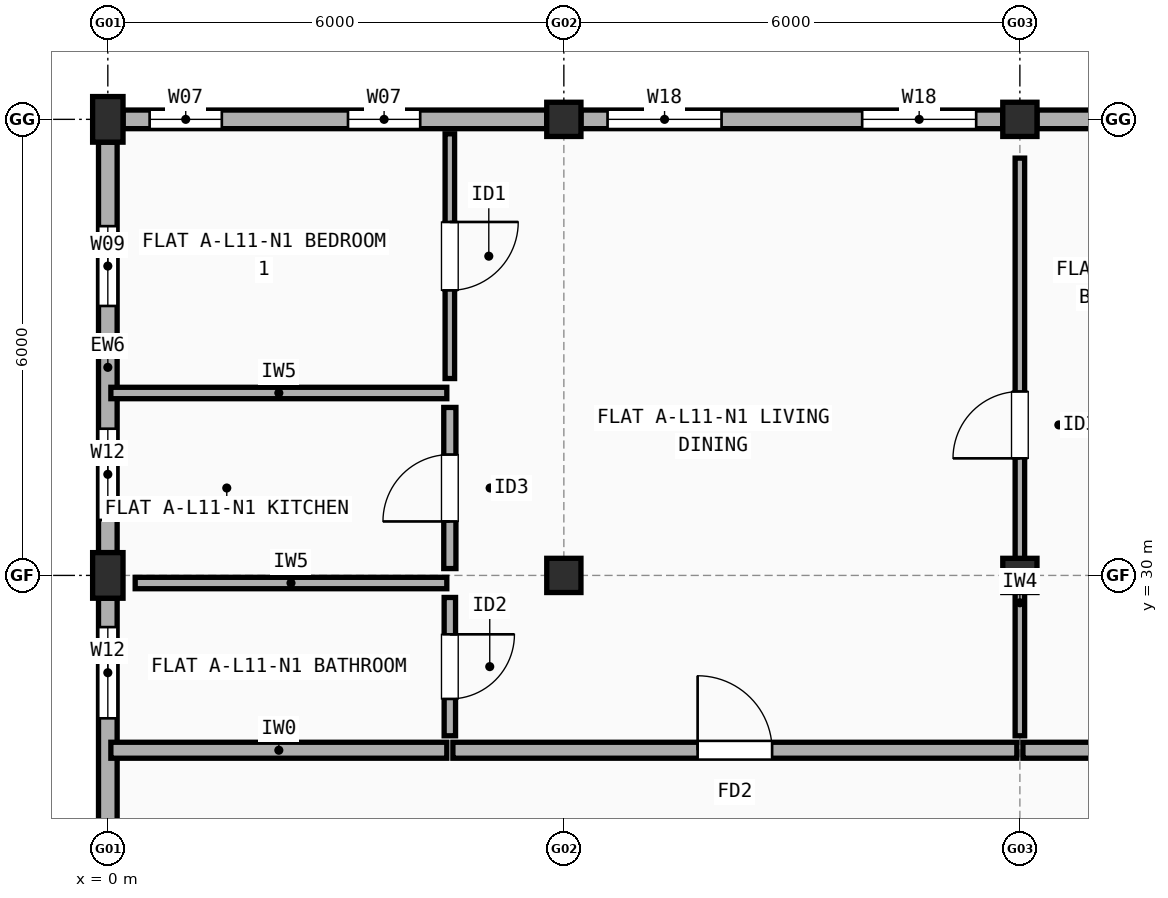
"""IFC4 building model, lengths in metres.
Left out: names, types, materials, properties, quantities, classifications, styles, units other than length and angle.
Written with IfcOpenShell. Run it as: python <this file> out.ifc"""

import sys

from ifc_helpers import new_model, si_unit, direction, frame, frame_2d, origin, origin_2d, place, context, subcontext, project, spatial, rectangle, extrude, element, fill, save


model = new_model("IFC4")
c1 = context("Model", 3, precision=1e-05, world=origin(), true_north=direction((0.0, 1.0)))
c2 = subcontext(c1, "Body", "Model", "MODEL_VIEW")
j1 = project(units=[si_unit("LENGTHUNIT", "METRE"), si_unit("PLANEANGLEUNIT", "RADIAN")], contexts=[c1])
p1 = place(None, origin())
s1 = spatial("IfcSite", under=j1, at=p1, CompositionType="ELEMENT")
p2 = place(p1, origin())
s2 = spatial("IfcBuilding", under=s1, at=p2, CompositionType="ELEMENT")
p3 = place(p2, frame((0.0, 0.0, 36.5)))
s3 = spatial("IfcBuildingStorey", under=s2, at=p3, CompositionType="ELEMENT", Elevation=36.5)
for number, where, z_axis, x_axis in (
    (1, (0.0, 30.0, 0.0), (0.0, 0.0, 1.0), (1.0, 0.0, 0.0)),
    (2, (0.0, 36.0, 0.0), (0.0, 0.0, 1.0), (1.0, 0.0, 0.0)),
):
    element("IfcColumn", number, at=place(p3, frame(where, z_axis=z_axis, x_axis=x_axis)), inside=s3, PredefinedType="COLUMN", context=c2, shape_type="SweptSolid", body=[
        extrude(rectangle(XDim=0.4, YDim=0.6, at=origin_2d()), origin(), (0.0, 0.0, 1.0), 2.995),
    ])
for number, where, z_axis, x_axis in (
    (3, (6.0, 30.0, 0.0), (0.0, 0.0, 1.0), (1.0, 0.0, 0.0)),
    (4, (6.0, 36.0, 0.0), (0.0, 0.0, 1.0), (1.0, 0.0, 0.0)),
    (5, (12.0, 30.0, 0.0), (0.0, 0.0, 1.0), (1.0, 0.0, 0.0)),
    (6, (12.0, 36.0, 0.0), (0.0, 0.0, 1.0), (1.0, 0.0, 0.0)),
):
    element("IfcColumn", number, at=place(p3, frame(where, z_axis=z_axis, x_axis=x_axis)), inside=s3, PredefinedType="COLUMN", context=c2, shape_type="SweptSolid", body=[
        extrude(rectangle(XDim=0.45, YDim=0.45, at=origin_2d()), origin(), (0.0, 0.0, 1.0), 2.995),
    ])
p4 = place(p3, frame((17.775, 36.0, 0.0), z_axis=(0.0, 0.0, 1.0), x_axis=(-1.0, 0.0, 0.0)))
e7 = element("IfcWall", 7, at=p4, inside=s3, PredefinedType="STANDARD", context=c2, shape_type="SweptSolid", body=[
    extrude(rectangle(XDim=5.55, YDim=0.245, at=frame_2d((2.775, 0.0))), origin(), (0.0, 0.0, 1.0), 2.477),
])
p5 = place(p4, frame((0.843, 0.0, 0.9)))
e8 = element("IfcOpeningElement", 8, at=p5, cuts=e7, PredefinedType="OPENING", context=c2, shape_type="SweptSolid", body=[
    extrude(rectangle(XDim=1.05, YDim=1.35, at=frame_2d((0.525, 0.675))), frame((0.0, 0.133, 0.0), z_axis=(0.0, -1.0, 0.0), x_axis=(1.0, 0.0, 0.0)), (0.0, 0.0, 1.0), 0.265),
])
p6 = place(p4, frame((3.583, 0.0, 0.9)))
e9 = element("IfcOpeningElement", 9, at=p6, cuts=e7, PredefinedType="OPENING", context=c2, shape_type="SweptSolid", body=[
    extrude(rectangle(XDim=1.2, YDim=1.35, at=frame_2d((0.6, 0.675))), frame((0.0, 0.133, 0.0), z_axis=(0.0, -1.0, 0.0), x_axis=(1.0, 0.0, 0.0)), (0.0, 0.0, 1.0), 0.265),
])
p7 = place(p3, frame((11.775, 36.0, 0.0), z_axis=(0.0, 0.0, 1.0), x_axis=(-1.0, 0.0, 0.0)))
e10 = element("IfcWall", 10, at=p7, inside=s3, PredefinedType="STANDARD", context=c2, shape_type="SweptSolid", body=[
    extrude(rectangle(XDim=5.55, YDim=0.245, at=frame_2d((2.775, 0.0))), origin(), (0.0, 0.0, 1.0), 2.477),
])
p8 = place(p7, frame((0.35, 0.0, 0.9)))
e11 = element("IfcOpeningElement", 11, at=p8, cuts=e10, PredefinedType="OPENING", context=c2, shape_type="SweptSolid", body=[
    extrude(rectangle(XDim=1.5, YDim=1.4, at=frame_2d((0.75, 0.7))), frame((0.0, 0.133, 0.0), z_axis=(0.0, -1.0, 0.0), x_axis=(1.0, 0.0, 0.0)), (0.0, 0.0, 1.0), 0.265),
])
p9 = place(p7, frame((3.7, 0.0, 0.9)))
e12 = element("IfcOpeningElement", 12, at=p9, cuts=e10, PredefinedType="OPENING", context=c2, shape_type="SweptSolid", body=[
    extrude(rectangle(XDim=1.5, YDim=1.4, at=frame_2d((0.75, 0.7))), frame((0.0, 0.133, 0.0), z_axis=(0.0, -1.0, 0.0), x_axis=(1.0, 0.0, 0.0)), (0.0, 0.0, 1.0), 0.265),
])
p10 = place(p3, frame((5.775, 36.0, 0.0), z_axis=(0.0, 0.0, 1.0), x_axis=(-1.0, 0.0, 0.0)))
e13 = element("IfcWall", 13, at=p10, inside=s3, PredefinedType="STANDARD", context=c2, shape_type="SweptSolid", body=[
    extrude(rectangle(XDim=5.575, YDim=0.245, at=frame_2d((2.788, 0.0))), origin(), (0.0, 0.0, 1.0), 2.477),
])
p11 = place(p10, frame((1.665, 0.0, 0.9)))
e14 = element("IfcOpeningElement", 14, at=p11, cuts=e13, PredefinedType="OPENING", context=c2, shape_type="SweptSolid", body=[
    extrude(rectangle(XDim=0.95, YDim=1.35, at=frame_2d((0.475, 0.675))), frame((0.0, 0.133, 0.0), z_axis=(0.0, -1.0, 0.0), x_axis=(1.0, 0.0, 0.0)), (0.0, 0.0, 1.0), 0.265),
])
p12 = place(p10, frame((4.275, 0.0, 0.9)))
e15 = element("IfcOpeningElement", 15, at=p12, cuts=e13, PredefinedType="OPENING", context=c2, shape_type="SweptSolid", body=[
    extrude(rectangle(XDim=0.95, YDim=1.35, at=frame_2d((0.475, 0.675))), frame((0.0, 0.133, 0.0), z_axis=(0.0, -1.0, 0.0), x_axis=(1.0, 0.0, 0.0)), (0.0, 0.0, 1.0), 0.265),
])
p13 = place(p3, frame((0.0, 35.7, 0.0), z_axis=(0.0, 0.0, 1.0), x_axis=(0.0, -1.0, 0.0)))
e16 = element("IfcWall", 16, at=p13, inside=s3, PredefinedType="STANDARD", context=c2, shape_type="SweptSolid", body=[
    extrude(rectangle(XDim=5.4, YDim=0.245, at=frame_2d((2.7, 0.0))), origin(), (0.0, 0.0, 1.0), 2.477),
])
p14 = place(p13, frame((1.105, 0.0, 0.9)))
e17 = element("IfcOpeningElement", 17, at=p14, cuts=e16, PredefinedType="OPENING", context=c2, shape_type="SweptSolid", body=[
    extrude(rectangle(XDim=1.05, YDim=1.35, at=frame_2d((0.525, 0.675))), frame((0.0, 0.133, 0.0), z_axis=(0.0, -1.0, 0.0), x_axis=(1.0, 0.0, 0.0)), (0.0, 0.0, 1.0), 0.265),
])
p15 = place(p13, frame((3.77, 0.0, 0.9)))
e18 = element("IfcOpeningElement", 18, at=p15, cuts=e16, PredefinedType="OPENING", context=c2, shape_type="SweptSolid", body=[
    extrude(rectangle(XDim=1.2, YDim=1.35, at=frame_2d((0.6, 0.675))), frame((0.0, 0.133, 0.0), z_axis=(0.0, -1.0, 0.0), x_axis=(1.0, 0.0, 0.0)), (0.0, 0.0, 1.0), 0.265),
])
p16 = place(p3, frame((0.0, 29.7, 0.0), z_axis=(0.0, 0.0, 1.0), x_axis=(0.0, -1.0, 0.0)))
e19 = element("IfcWall", 19, at=p16, inside=s3, PredefinedType="STANDARD", context=c2, shape_type="SweptSolid", body=[
    extrude(rectangle(XDim=5.4, YDim=0.245, at=frame_2d((2.7, 0.0))), origin(), (0.0, 0.0, 1.0), 2.477),
])
p17 = place(p16, frame((0.38, 0.0, 0.9)))
e20 = element("IfcOpeningElement", 20, at=p17, cuts=e19, PredefinedType="OPENING", context=c2, shape_type="SweptSolid", body=[
    extrude(rectangle(XDim=1.2, YDim=1.35, at=frame_2d((0.6, 0.675))), frame((0.0, 0.133, 0.0), z_axis=(0.0, -1.0, 0.0), x_axis=(1.0, 0.0, 0.0)), (0.0, 0.0, 1.0), 0.265),
])
p18 = place(p16, frame((3.27, 0.0, 0.9)))
e21 = element("IfcOpeningElement", 21, at=p18, cuts=e19, PredefinedType="OPENING", context=c2, shape_type="SweptSolid", body=[
    extrude(rectangle(XDim=0.9, YDim=1.4, at=frame_2d((0.45, 0.7))), frame((0.0, 0.133, 0.0), z_axis=(0.0, -1.0, 0.0), x_axis=(1.0, 0.0, 0.0)), (0.0, 0.0, 1.0), 0.265),
])
p19 = place(p3, frame((0.04, 27.7, 0.0), z_axis=(0.0, 0.0, 1.0), x_axis=(1.0, 0.0, 0.0)))
e22 = element("IfcWall", 22, at=p19, inside=s3, PredefinedType="SOLIDWALL", context=c2, shape_type="SweptSolid", body=[
    extrude(rectangle(XDim=4.42, YDim=0.21, at=frame_2d((2.21, 0.0))), origin(), (0.0, 0.0, 1.0), 2.477),
])
p20 = place(p3, frame((4.54, 27.7, 0.0), z_axis=(0.0, 0.0, 1.0), x_axis=(1.0, 0.0, 0.0)))
e23 = element("IfcWall", 23, at=p20, inside=s3, PredefinedType="SOLIDWALL", context=c2, shape_type="SweptSolid", body=[
    extrude(rectangle(XDim=7.42, YDim=0.21, at=frame_2d((3.71, 0.0))), origin(), (0.0, 0.0, 1.0), 2.508),
])
p21 = place(p20, frame((3.22, 0.0, 0.0)))
e24 = element("IfcOpeningElement", 24, at=p21, cuts=e23, PredefinedType="OPENING", context=c2, shape_type="SweptSolid", body=[
    extrude(rectangle(XDim=0.98, YDim=2.15, at=frame_2d((0.49, 1.075))), frame((0.0, 0.115, 0.0), z_axis=(0.0, -1.0, 0.0), x_axis=(1.0, 0.0, 0.0)), (0.0, 0.0, 1.0), 0.23),
])
p22 = place(p3, frame((4.5, 32.59, 0.0), z_axis=(0.0, 0.0, 1.0), x_axis=(0.0, 1.0, 0.0)))
e25 = element("IfcWall", 25, at=p22, inside=s3, PredefinedType="PARTITIONING", context=c2, shape_type="SweptSolid", body=[
    extrude(rectangle(XDim=3.22, YDim=0.125, at=frame_2d((1.61, 0.0))), origin(), (0.0, 0.0, 1.0), 2.995),
])
p23 = place(p22, frame((1.16, 0.0, 0.0)))
e26 = element("IfcOpeningElement", 26, at=p23, cuts=e25, PredefinedType="OPENING", context=c2, shape_type="SweptSolid", body=[
    extrude(rectangle(XDim=0.9, YDim=2.1, at=frame_2d((0.45, 1.05))), frame((0.0, 0.073, 0.0), z_axis=(0.0, -1.0, 0.0), x_axis=(1.0, 0.0, 0.0)), (0.0, 0.0, 1.0), 0.145),
])
p24 = place(p3, frame((4.5, 30.09, 0.0), z_axis=(0.0, 0.0, 1.0), x_axis=(0.0, 1.0, 0.0)))
e27 = element("IfcWall", 27, at=p24, inside=s3, PredefinedType="PLUMBINGWALL", context=c2, shape_type="SweptSolid", body=[
    extrude(rectangle(XDim=2.12, YDim=0.16, at=frame_2d((1.06, 0.0))), origin(), (0.0, 0.0, 1.0), 2.527),
])
p25 = place(p24, frame((0.62, 0.0, 0.0)))
e28 = element("IfcOpeningElement", 28, at=p25, cuts=e27, PredefinedType="OPENING", context=c2, shape_type="SweptSolid", body=[
    extrude(rectangle(XDim=0.88, YDim=2.1, at=frame_2d((0.44, 1.05))), frame((0.0, 0.09, 0.0), z_axis=(0.0, -1.0, 0.0), x_axis=(1.0, 0.0, 0.0)), (0.0, 0.0, 1.0), 0.18),
])
p26 = place(p3, frame((4.5, 27.89, 0.0), z_axis=(0.0, 0.0, 1.0), x_axis=(0.0, 1.0, 0.0)))
e29 = element("IfcWall", 29, at=p26, inside=s3, PredefinedType="PARTITIONING", context=c2, shape_type="SweptSolid", body=[
    extrude(rectangle(XDim=1.82, YDim=0.15, at=frame_2d((0.91, 0.0))), origin(), (0.0, 0.0, 1.0), 2.995),
])
p27 = place(p26, frame((0.485, 0.0, 0.0)))
e30 = element("IfcOpeningElement", 30, at=p27, cuts=e29, PredefinedType="OPENING", context=c2, shape_type="SweptSolid", body=[
    extrude(rectangle(XDim=0.85, YDim=2.1, at=frame_2d((0.425, 1.05))), frame((0.0, 0.085, 0.0), z_axis=(0.0, -1.0, 0.0), x_axis=(1.0, 0.0, 0.0)), (0.0, 0.0, 1.0), 0.17),
])
p28 = place(p3, frame((0.04, 32.4, 0.0), z_axis=(0.0, 0.0, 1.0), x_axis=(1.0, 0.0, 0.0)))
e31 = element("IfcWall", 31, at=p28, inside=s3, PredefinedType="PARTITIONING", context=c2, shape_type="SweptSolid", body=[
    extrude(rectangle(XDim=4.42, YDim=0.15, at=frame_2d((2.21, 0.0))), origin(), (0.0, 0.0, 1.0), 2.477),
])
p29 = place(p3, frame((0.36, 29.9, 0.0), z_axis=(0.0, 0.0, 1.0), x_axis=(1.0, 0.0, 0.0)))
e32 = element("IfcWall", 32, at=p29, inside=s3, PredefinedType="PARTITIONING", context=c2, shape_type="SweptSolid", body=[
    extrude(rectangle(XDim=4.1, YDim=0.15, at=frame_2d((2.05, 0.0))), origin(), (0.0, 0.0, 1.0), 2.527),
])
p30 = place(p3, frame((12.04, 27.7, 0.0), z_axis=(0.0, 0.0, 1.0), x_axis=(1.0, 0.0, 0.0)))
e33 = element("IfcWall", 33, at=p30, inside=s3, PredefinedType="SOLIDWALL", context=c2, shape_type="SweptSolid", body=[
    extrude(rectangle(XDim=2.92, YDim=0.21, at=frame_2d((1.46, 0.0))), origin(), (0.0, 0.0, 1.0), 2.508),
])
p31 = place(p3, frame((12.0, 27.89, 0.0), z_axis=(0.0, 0.0, 1.0), x_axis=(0.0, 1.0, 0.0)))
e34 = element("IfcWall", 34, at=p31, inside=s3, PredefinedType="PARTITIONING", context=c2, shape_type="SweptSolid", body=[
    extrude(rectangle(XDim=7.6, YDim=0.125, at=frame_2d((3.8, 0.0))), origin(), (0.0, 0.0, 1.0), 2.508),
])
p32 = place(p31, frame((3.65, 0.0, 0.0)))
e35 = element("IfcOpeningElement", 35, at=p32, cuts=e34, PredefinedType="OPENING", context=c2, shape_type="SweptSolid", body=[
    extrude(rectangle(XDim=0.88, YDim=2.1, at=frame_2d((0.44, 1.05))), frame((0.0, 0.073, 0.0), z_axis=(0.0, -1.0, 0.0), x_axis=(1.0, 0.0, 0.0)), (0.0, 0.0, 1.0), 0.145),
])
p33 = place(p8, origin())
e36 = element("IfcWindow", 36, at=p33, inside=s3, PartitioningType="SINGLE_PANEL", PredefinedType="WINDOW", context=c2, shape_type="SweptSolid", body=[
    extrude(rectangle(XDim=1.5, YDim=1.4, at=frame_2d((0.75, 0.7))), frame((0.0, 0.03, 0.0), z_axis=(0.0, -1.0, 0.0), x_axis=(1.0, 0.0, 0.0)), (0.0, 0.0, 1.0), 0.06),
])
fill(e11, e36)
p34 = place(p9, origin())
e37 = element("IfcWindow", 37, at=p34, inside=s3, PartitioningType="SINGLE_PANEL", PredefinedType="WINDOW", context=c2, shape_type="SweptSolid", body=[
    extrude(rectangle(XDim=1.5, YDim=1.4, at=frame_2d((0.75, 0.7))), frame((0.0, 0.03, 0.0), z_axis=(0.0, -1.0, 0.0), x_axis=(1.0, 0.0, 0.0)), (0.0, 0.0, 1.0), 0.06),
])
fill(e12, e37)
p35 = place(p11, origin())
e38 = element("IfcWindow", 38, at=p35, inside=s3, PartitioningType="SINGLE_PANEL", PredefinedType="WINDOW", context=c2, shape_type="SweptSolid", body=[
    extrude(rectangle(XDim=0.95, YDim=1.35, at=frame_2d((0.475, 0.675))), frame((0.0, 0.03, 0.0), z_axis=(0.0, -1.0, 0.0), x_axis=(1.0, 0.0, 0.0)), (0.0, 0.0, 1.0), 0.06),
])
fill(e14, e38)
p36 = place(p12, origin())
e39 = element("IfcWindow", 39, at=p36, inside=s3, PartitioningType="SINGLE_PANEL", PredefinedType="WINDOW", context=c2, shape_type="SweptSolid", body=[
    extrude(rectangle(XDim=0.95, YDim=1.35, at=frame_2d((0.475, 0.675))), frame((0.0, 0.03, 0.0), z_axis=(0.0, -1.0, 0.0), x_axis=(1.0, 0.0, 0.0)), (0.0, 0.0, 1.0), 0.06),
])
fill(e15, e39)
p37 = place(p14, origin())
e40 = element("IfcWindow", 40, at=p37, inside=s3, PartitioningType="SINGLE_PANEL", PredefinedType="WINDOW", context=c2, shape_type="SweptSolid", body=[
    extrude(rectangle(XDim=1.05, YDim=1.35, at=frame_2d((0.525, 0.675))), frame((0.0, 0.03, 0.0), z_axis=(0.0, -1.0, 0.0), x_axis=(1.0, 0.0, 0.0)), (0.0, 0.0, 1.0), 0.06),
])
fill(e17, e40)
p38 = place(p15, origin())
e41 = element("IfcWindow", 41, at=p38, inside=s3, PartitioningType="SINGLE_PANEL", PredefinedType="WINDOW", context=c2, shape_type="SweptSolid", body=[
    extrude(rectangle(XDim=1.2, YDim=1.35, at=frame_2d((0.6, 0.675))), frame((0.0, 0.03, 0.0), z_axis=(0.0, -1.0, 0.0), x_axis=(1.0, 0.0, 0.0)), (0.0, 0.0, 1.0), 0.06),
])
fill(e18, e41)
p39 = place(p17, origin())
e42 = element("IfcWindow", 42, at=p39, inside=s3, PartitioningType="SINGLE_PANEL", PredefinedType="WINDOW", context=c2, shape_type="SweptSolid", body=[
    extrude(rectangle(XDim=1.2, YDim=1.35, at=frame_2d((0.6, 0.675))), frame((0.0, 0.03, 0.0), z_axis=(0.0, -1.0, 0.0), x_axis=(1.0, 0.0, 0.0)), (0.0, 0.0, 1.0), 0.06),
])
fill(e20, e42)
p40 = place(p21, origin())
e43 = element("IfcDoor", 43, at=p40, inside=s3, OperationType="SINGLE_SWING_LEFT", PredefinedType="DOOR", context=c2, shape_type="SweptSolid", body=[
    extrude(rectangle(XDim=0.98, YDim=2.15, at=frame_2d((0.49, 1.075))), frame((0.0, 0.025, 0.0), z_axis=(0.0, -1.0, 0.0), x_axis=(1.0, 0.0, 0.0)), (0.0, 0.0, 1.0), 0.05),
])
fill(e24, e43)
p41 = place(p23, origin())
e44 = element("IfcDoor", 44, at=p41, inside=s3, OperationType="SINGLE_SWING_RIGHT", PredefinedType="DOOR", context=c2, shape_type="SweptSolid", body=[
    extrude(rectangle(XDim=0.9, YDim=2.1, at=frame_2d((0.45, 1.05))), frame((0.0, 0.025, 0.0), z_axis=(0.0, -1.0, 0.0), x_axis=(1.0, 0.0, 0.0)), (0.0, 0.0, 1.0), 0.05),
])
fill(e26, e44)
p42 = place(p25, origin())
e45 = element("IfcDoor", 45, at=p42, inside=s3, OperationType="SINGLE_SWING_LEFT", PredefinedType="DOOR", context=c2, shape_type="SweptSolid", body=[
    extrude(rectangle(XDim=0.88, YDim=2.1, at=frame_2d((0.44, 1.05))), frame((0.0, 0.025, 0.0), z_axis=(0.0, -1.0, 0.0), x_axis=(1.0, 0.0, 0.0)), (0.0, 0.0, 1.0), 0.05),
])
fill(e28, e45)
p43 = place(p27, origin())
e46 = element("IfcDoor", 46, at=p43, inside=s3, OperationType="SINGLE_SWING_RIGHT", PredefinedType="DOOR", context=c2, shape_type="SweptSolid", body=[
    extrude(rectangle(XDim=0.85, YDim=2.1, at=frame_2d((0.425, 1.05))), frame((0.0, 0.025, 0.0), z_axis=(0.0, -1.0, 0.0), x_axis=(1.0, 0.0, 0.0)), (0.0, 0.0, 1.0), 0.05),
])
fill(e30, e46)
p44 = place(p32, origin())
e47 = element("IfcDoor", 47, at=p44, inside=s3, OperationType="SINGLE_SWING_LEFT", PredefinedType="DOOR", context=c2, shape_type="SweptSolid", body=[
    extrude(rectangle(XDim=0.88, YDim=2.1, at=frame_2d((0.44, 1.05))), frame((0.0, 0.025, 0.0), z_axis=(0.0, -1.0, 0.0), x_axis=(1.0, 0.0, 0.0)), (0.0, 0.0, 1.0), 0.05),
])
fill(e35, e47)
save(model, sys.argv[1])
